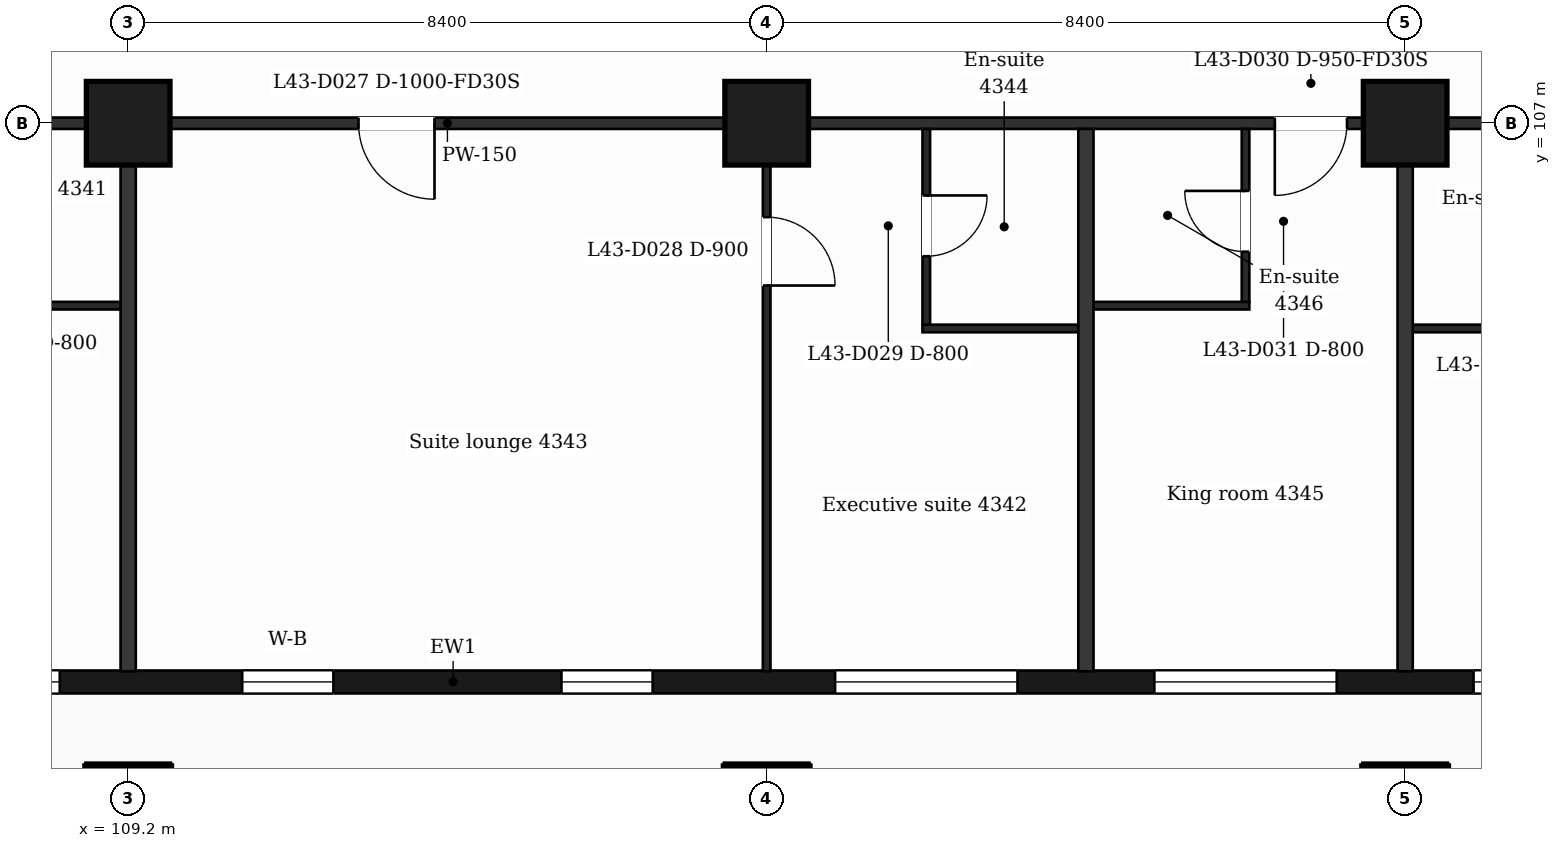
"""IFC4 building model, lengths in metres.
Left out: names, types, materials, properties, quantities, classifications, styles, units other than length and angle.
Written with IfcOpenShell. Run it as: python <this file> out.ifc"""

import sys

from ifc_helpers import new_model, si_unit, direction, frame, frame_2d, origin, origin_2d, place, context, subcontext, project, spatial, rectangle, extrude, element, fill, save


model = new_model("IFC4")
c1 = context("Model", 3, precision=1e-05, world=origin(), true_north=direction((0.0, 1.0)))
c2 = subcontext(c1, "Body", "Model", "MODEL_VIEW")
j1 = project(units=[si_unit("LENGTHUNIT", "METRE"), si_unit("PLANEANGLEUNIT", "RADIAN")], contexts=[c1])
p1 = place(None, origin())
s1 = spatial("IfcSite", under=j1, at=p1, CompositionType="ELEMENT")
p2 = place(p1, origin())
s2 = spatial("IfcBuilding", under=s1, at=p2, CompositionType="ELEMENT")
p3 = place(p2, frame((0.0, 0.0, 181.1)))
s3 = spatial("IfcBuildingStorey", under=s2, at=p3, CompositionType="ELEMENT", Elevation=181.1)
for number, where, z_axis, x_axis in (
    (1, (109.2, 98.0, 0.0), (0.0, 0.0, 1.0), (1.0, 0.0, 0.0)),
    (2, (117.6, 98.0, 0.0), (0.0, 0.0, 1.0), (1.0, 0.0, 0.0)),
    (3, (126.0, 98.0, 0.0), (0.0, 0.0, 1.0), (1.0, 0.0, 0.0)),
    (4, (109.2, 107.0, 0.0), (0.0, 0.0, 1.0), (1.0, 0.0, 0.0)),
    (5, (117.6, 107.0, 0.0), (0.0, 0.0, 1.0), (1.0, 0.0, 0.0)),
    (6, (126.0, 107.0, 0.0), (0.0, 0.0, 1.0), (1.0, 0.0, 0.0)),
):
    element("IfcColumn", number, at=place(p3, frame(where, z_axis=z_axis, x_axis=x_axis)), inside=s3, PredefinedType="COLUMN", context=c2, shape_type="SweptSolid", body=[
        extrude(rectangle(XDim=1.1, YDim=1.1, at=origin_2d()), origin(), (0.0, 0.0, 1.0), 3.7),
    ])
p4 = place(p3, frame((89.85, 99.65, 0.0), z_axis=(0.0, 0.0, 1.0), x_axis=(1.0, 0.0, 0.0)))
e7 = element("IfcWall", 7, at=p4, inside=s3, PredefinedType="SOLIDWALL", context=c2, shape_type="SweptSolid", body=[
    extrude(rectangle(XDim=47.25, YDim=0.3, at=frame_2d((23.625, 0.0))), origin(), (0.0, 0.0, 1.0), 3.38),
])
p5 = place(p4, frame((0.725, 0.0, 0.9)))
e8 = element("IfcOpeningElement", 8, at=p5, cuts=e7, PredefinedType="OPENING", context=c2, shape_type="SweptSolid", body=[
    extrude(rectangle(XDim=1.2, YDim=2.1, at=frame_2d((0.6, 1.05))), frame((0.0, 0.16, 0.0), z_axis=(0.0, -1.0, 0.0), x_axis=(1.0, 0.0, 0.0)), (0.0, 0.0, 1.0), 0.32),
])
p6 = place(p4, frame((3.45, 0.0, 0.9)))
e9 = element("IfcOpeningElement", 9, at=p6, cuts=e7, PredefinedType="OPENING", context=c2, shape_type="SweptSolid", body=[
    extrude(rectangle(XDim=2.4, YDim=2.1, at=frame_2d((1.2, 1.05))), frame((0.0, 0.16, 0.0), z_axis=(0.0, -1.0, 0.0), x_axis=(1.0, 0.0, 0.0)), (0.0, 0.0, 1.0), 0.32),
])
p7 = place(p4, frame((7.35, 0.0, 0.0)))
e10 = element("IfcOpeningElement", 10, at=p7, cuts=e7, PredefinedType="OPENING", context=c2, shape_type="SweptSolid", body=[
    extrude(rectangle(XDim=1.2, YDim=2.4, at=frame_2d((0.6, 1.2))), frame((0.0, 0.16, 0.0), z_axis=(0.0, -1.0, 0.0), x_axis=(1.0, 0.0, 0.0)), (0.0, 0.0, 1.0), 0.32),
])
p8 = place(p4, frame((9.15, 0.0, 0.9)))
e11 = element("IfcOpeningElement", 11, at=p8, cuts=e7, PredefinedType="OPENING", context=c2, shape_type="SweptSolid", body=[
    extrude(rectangle(XDim=1.2, YDim=2.1, at=frame_2d((0.6, 1.05))), frame((0.0, 0.16, 0.0), z_axis=(0.0, -1.0, 0.0), x_axis=(1.0, 0.0, 0.0)), (0.0, 0.0, 1.0), 0.32),
])
p9 = place(p4, frame((11.85, 0.0, 0.9)))
e12 = element("IfcOpeningElement", 12, at=p9, cuts=e7, PredefinedType="OPENING", context=c2, shape_type="SweptSolid", body=[
    extrude(rectangle(XDim=2.4, YDim=2.1, at=frame_2d((1.2, 1.05))), frame((0.0, 0.16, 0.0), z_axis=(0.0, -1.0, 0.0), x_axis=(1.0, 0.0, 0.0)), (0.0, 0.0, 1.0), 0.32),
])
p10 = place(p4, frame((16.05, 0.0, 0.9)))
e13 = element("IfcOpeningElement", 13, at=p10, cuts=e7, PredefinedType="OPENING", context=c2, shape_type="SweptSolid", body=[
    extrude(rectangle(XDim=2.4, YDim=2.1, at=frame_2d((1.2, 1.05))), frame((0.0, 0.16, 0.0), z_axis=(0.0, -1.0, 0.0), x_axis=(1.0, 0.0, 0.0)), (0.0, 0.0, 1.0), 0.32),
])
p11 = place(p4, frame((20.85, 0.0, 0.9)))
e14 = element("IfcOpeningElement", 14, at=p11, cuts=e7, PredefinedType="OPENING", context=c2, shape_type="SweptSolid", body=[
    extrude(rectangle(XDim=1.2, YDim=2.1, at=frame_2d((0.6, 1.05))), frame((0.0, 0.16, 0.0), z_axis=(0.0, -1.0, 0.0), x_axis=(1.0, 0.0, 0.0)), (0.0, 0.0, 1.0), 0.32),
])
p12 = place(p4, frame((25.05, 0.0, 0.9)))
e15 = element("IfcOpeningElement", 15, at=p12, cuts=e7, PredefinedType="OPENING", context=c2, shape_type="SweptSolid", body=[
    extrude(rectangle(XDim=1.2, YDim=2.1, at=frame_2d((0.6, 1.05))), frame((0.0, 0.16, 0.0), z_axis=(0.0, -1.0, 0.0), x_axis=(1.0, 0.0, 0.0)), (0.0, 0.0, 1.0), 0.32),
])
p13 = place(p4, frame((28.65, 0.0, 0.9)))
e16 = element("IfcOpeningElement", 16, at=p13, cuts=e7, PredefinedType="OPENING", context=c2, shape_type="SweptSolid", body=[
    extrude(rectangle(XDim=2.4, YDim=2.1, at=frame_2d((1.2, 1.05))), frame((0.0, 0.16, 0.0), z_axis=(0.0, -1.0, 0.0), x_axis=(1.0, 0.0, 0.0)), (0.0, 0.0, 1.0), 0.32),
])
p14 = place(p4, frame((32.85, 0.0, 0.9)))
e17 = element("IfcOpeningElement", 17, at=p14, cuts=e7, PredefinedType="OPENING", context=c2, shape_type="SweptSolid", body=[
    extrude(rectangle(XDim=2.4, YDim=2.1, at=frame_2d((1.2, 1.05))), frame((0.0, 0.16, 0.0), z_axis=(0.0, -1.0, 0.0), x_axis=(1.0, 0.0, 0.0)), (0.0, 0.0, 1.0), 0.32),
])
p15 = place(p4, frame((37.05, 0.0, 0.9)))
e18 = element("IfcOpeningElement", 18, at=p15, cuts=e7, PredefinedType="OPENING", context=c2, shape_type="SweptSolid", body=[
    extrude(rectangle(XDim=2.4, YDim=2.1, at=frame_2d((1.2, 1.05))), frame((0.0, 0.16, 0.0), z_axis=(0.0, -1.0, 0.0), x_axis=(1.0, 0.0, 0.0)), (0.0, 0.0, 1.0), 0.32),
])
p16 = place(p4, frame((41.25, 0.0, 0.9)))
e19 = element("IfcOpeningElement", 19, at=p16, cuts=e7, PredefinedType="OPENING", context=c2, shape_type="SweptSolid", body=[
    extrude(rectangle(XDim=2.4, YDim=2.1, at=frame_2d((1.2, 1.05))), frame((0.0, 0.16, 0.0), z_axis=(0.0, -1.0, 0.0), x_axis=(1.0, 0.0, 0.0)), (0.0, 0.0, 1.0), 0.32),
])
p17 = place(p4, frame((45.25, 0.0, 0.9)))
e20 = element("IfcOpeningElement", 20, at=p17, cuts=e7, PredefinedType="OPENING", context=c2, shape_type="SweptSolid", body=[
    extrude(rectangle(XDim=1.2, YDim=2.1, at=frame_2d((0.6, 1.05))), frame((0.0, 0.16, 0.0), z_axis=(0.0, -1.0, 0.0), x_axis=(1.0, 0.0, 0.0)), (0.0, 0.0, 1.0), 0.32),
])
p18 = place(p3, frame((119.65, 104.3, 0.0), z_axis=(0.0, 0.0, 1.0), x_axis=(1.0, 0.0, 0.0)))
e21 = element("IfcWall", 21, at=p18, inside=s3, PredefinedType="PARTITIONING", context=c2, shape_type="SweptSolid", body=[
    extrude(rectangle(XDim=2.15, YDim=0.1, at=frame_2d((1.075, 0.0))), origin(), (0.0, 0.0, 1.0), 3.38),
])
p19 = place(p3, frame((126.0, 104.3, 0.0), z_axis=(0.0, 0.0, 1.0), x_axis=(1.0, 0.0, 0.0)))
e22 = element("IfcWall", 22, at=p19, inside=s3, PredefinedType="PARTITIONING", context=c2, shape_type="SweptSolid", body=[
    extrude(rectangle(XDim=2.75, YDim=0.1, at=frame_2d((1.375, 0.0))), origin(), (0.0, 0.0, 1.0), 3.38),
])
p20 = place(p19, frame((1.07, 0.0, 0.0)))
e23 = element("IfcOpeningElement", 23, at=p20, cuts=e22, PredefinedType="OPENING", context=c2, shape_type="SweptSolid", body=[
    extrude(rectangle(XDim=0.8, YDim=2.1, at=frame_2d((0.4, 1.05))), frame((0.0, 0.06, 0.0), z_axis=(0.0, -1.0, 0.0), x_axis=(1.0, 0.0, 0.0)), (0.0, 0.0, 1.0), 0.12),
])
p21 = place(p3, frame((106.45, 104.6, 0.0), z_axis=(0.0, 0.0, 1.0), x_axis=(1.0, 0.0, 0.0)))
e24 = element("IfcWall", 24, at=p21, inside=s3, PredefinedType="PARTITIONING", context=c2, shape_type="SweptSolid", body=[
    extrude(rectangle(XDim=2.75, YDim=0.1, at=frame_2d((1.375, 0.0))), origin(), (0.0, 0.0, 1.0), 3.38),
])
p22 = place(p21, frame((0.88, 0.0, 0.0)))
e25 = element("IfcOpeningElement", 25, at=p22, cuts=e24, PredefinedType="OPENING", context=c2, shape_type="SweptSolid", body=[
    extrude(rectangle(XDim=0.8, YDim=2.1, at=frame_2d((0.4, 1.05))), frame((0.0, 0.06, 0.0), z_axis=(0.0, -1.0, 0.0), x_axis=(1.0, 0.0, 0.0)), (0.0, 0.0, 1.0), 0.12),
])
p23 = place(p3, frame((121.8, 104.6, 0.0), z_axis=(0.0, 0.0, 1.0), x_axis=(1.0, 0.0, 0.0)))
e26 = element("IfcWall", 26, at=p23, inside=s3, PredefinedType="PARTITIONING", context=c2, shape_type="SweptSolid", body=[
    extrude(rectangle(XDim=2.15, YDim=0.1, at=frame_2d((1.075, 0.0))), origin(), (0.0, 0.0, 1.0), 3.38),
])
p24 = place(p3, frame((87.018, 107.0, 0.0), z_axis=(0.0, 0.0, 1.0), x_axis=(1.0, 0.0, 0.0)))
e27 = element("IfcWall", 27, at=p24, inside=s3, PredefinedType="PARTITIONING", context=c2, shape_type="SweptSolid", body=[
    extrude(rectangle(XDim=52.765, YDim=0.15, at=frame_2d((26.382, 0.0))), origin(), (0.0, 0.0, 1.0), 3.38),
])
p25 = place(p24, frame((1.276, 0.0, 0.0)))
e28 = element("IfcOpeningElement", 28, at=p25, cuts=e27, PredefinedType="OPENING", context=c2, shape_type="SweptSolid", body=[
    extrude(rectangle(XDim=0.95, YDim=2.1, at=frame_2d((0.475, 1.05))), frame((0.0, 0.085, 0.0), z_axis=(0.0, -1.0, 0.0), x_axis=(1.0, 0.0, 0.0)), (0.0, 0.0, 1.0), 0.17),
])
p26 = place(p24, frame((8.357, 0.0, 0.0)))
e29 = element("IfcOpeningElement", 29, at=p26, cuts=e27, PredefinedType="OPENING", context=c2, shape_type="SweptSolid", body=[
    extrude(rectangle(XDim=0.95, YDim=2.1, at=frame_2d((0.475, 1.05))), frame((0.0, 0.085, 0.0), z_axis=(0.0, -1.0, 0.0), x_axis=(1.0, 0.0, 0.0)), (0.0, 0.0, 1.0), 0.17),
])
p27 = place(p24, frame((9.832, 0.0, 0.0)))
e30 = element("IfcOpeningElement", 30, at=p27, cuts=e27, PredefinedType="OPENING", context=c2, shape_type="SweptSolid", body=[
    extrude(rectangle(XDim=1.0, YDim=2.1, at=frame_2d((0.5, 1.05))), frame((0.0, 0.085, 0.0), z_axis=(0.0, -1.0, 0.0), x_axis=(1.0, 0.0, 0.0)), (0.0, 0.0, 1.0), 0.17),
])
p28 = place(p24, frame((14.547, 0.0, 0.0)))
e31 = element("IfcOpeningElement", 31, at=p28, cuts=e27, PredefinedType="OPENING", context=c2, shape_type="SweptSolid", body=[
    extrude(rectangle(XDim=0.95, YDim=2.1, at=frame_2d((0.475, 1.05))), frame((0.0, 0.085, 0.0), z_axis=(0.0, -1.0, 0.0), x_axis=(1.0, 0.0, 0.0)), (0.0, 0.0, 1.0), 0.17),
])
p29 = place(p24, frame((18.257, 0.0, 0.0)))
e32 = element("IfcOpeningElement", 32, at=p29, cuts=e27, PredefinedType="OPENING", context=c2, shape_type="SweptSolid", body=[
    extrude(rectangle(XDim=0.95, YDim=2.1, at=frame_2d((0.475, 1.05))), frame((0.0, 0.085, 0.0), z_axis=(0.0, -1.0, 0.0), x_axis=(1.0, 0.0, 0.0)), (0.0, 0.0, 1.0), 0.17),
])
p30 = place(p24, frame((25.212, 0.0, 0.0)))
e33 = element("IfcOpeningElement", 33, at=p30, cuts=e27, PredefinedType="OPENING", context=c2, shape_type="SweptSolid", body=[
    extrude(rectangle(XDim=1.0, YDim=2.1, at=frame_2d((0.5, 1.05))), frame((0.0, 0.085, 0.0), z_axis=(0.0, -1.0, 0.0), x_axis=(1.0, 0.0, 0.0)), (0.0, 0.0, 1.0), 0.17),
])
p31 = place(p24, frame((37.267, 0.0, 0.0)))
e34 = element("IfcOpeningElement", 34, at=p31, cuts=e27, PredefinedType="OPENING", context=c2, shape_type="SweptSolid", body=[
    extrude(rectangle(XDim=0.95, YDim=2.1, at=frame_2d((0.475, 1.05))), frame((0.0, 0.085, 0.0), z_axis=(0.0, -1.0, 0.0), x_axis=(1.0, 0.0, 0.0)), (0.0, 0.0, 1.0), 0.17),
])
p32 = place(p24, frame((41.957, 0.0, 0.0)))
e35 = element("IfcOpeningElement", 35, at=p32, cuts=e27, PredefinedType="OPENING", context=c2, shape_type="SweptSolid", body=[
    extrude(rectangle(XDim=0.95, YDim=2.1, at=frame_2d((0.475, 1.05))), frame((0.0, 0.085, 0.0), z_axis=(0.0, -1.0, 0.0), x_axis=(1.0, 0.0, 0.0)), (0.0, 0.0, 1.0), 0.17),
])
p33 = place(p24, frame((45.632, 0.0, 0.0)))
e36 = element("IfcOpeningElement", 36, at=p33, cuts=e27, PredefinedType="OPENING", context=c2, shape_type="SweptSolid", body=[
    extrude(rectangle(XDim=0.95, YDim=2.1, at=frame_2d((0.475, 1.05))), frame((0.0, 0.085, 0.0), z_axis=(0.0, -1.0, 0.0), x_axis=(1.0, 0.0, 0.0)), (0.0, 0.0, 1.0), 0.17),
])
p34 = place(p24, frame((48.767, 0.0, 0.0)))
e37 = element("IfcOpeningElement", 37, at=p34, cuts=e27, PredefinedType="OPENING", context=c2, shape_type="SweptSolid", body=[
    extrude(rectangle(XDim=0.95, YDim=2.1, at=frame_2d((0.475, 1.05))), frame((0.0, 0.085, 0.0), z_axis=(0.0, -1.0, 0.0), x_axis=(1.0, 0.0, 0.0)), (0.0, 0.0, 1.0), 0.17),
])
p35 = place(p3, frame((109.2, 99.79, 0.0), z_axis=(0.0, 0.0, 1.0), x_axis=(0.0, 1.0, 0.0)))
e38 = element("IfcWall", 38, at=p35, inside=s3, PredefinedType="PARTITIONING", context=c2, shape_type="SweptSolid", body=[
    extrude(rectangle(XDim=7.135, YDim=0.2, at=frame_2d((3.567, 0.0))), origin(), (0.0, 0.0, 1.0), 3.38),
])
p36 = place(p3, frame((117.6, 99.79, 0.0), z_axis=(0.0, 0.0, 1.0), x_axis=(0.0, 1.0, 0.0)))
e39 = element("IfcWall", 39, at=p36, inside=s3, PredefinedType="PARTITIONING", context=c2, shape_type="SweptSolid", body=[
    extrude(rectangle(XDim=7.135, YDim=0.1, at=frame_2d((3.567, 0.0))), origin(), (0.0, 0.0, 1.0), 3.38),
])
p37 = place(p36, frame((5.075, 0.0, 0.0)))
e40 = element("IfcOpeningElement", 40, at=p37, cuts=e39, PredefinedType="OPENING", context=c2, shape_type="SweptSolid", body=[
    extrude(rectangle(XDim=0.9, YDim=2.1, at=frame_2d((0.45, 1.05))), frame((0.0, 0.06, 0.0), z_axis=(0.0, -1.0, 0.0), x_axis=(1.0, 0.0, 0.0)), (0.0, 0.0, 1.0), 0.12),
])
p38 = place(p3, frame((119.7, 104.35, 0.0), z_axis=(0.0, 0.0, 1.0), x_axis=(0.0, 1.0, 0.0)))
e41 = element("IfcWall", 41, at=p38, inside=s3, PredefinedType="PARTITIONING", context=c2, shape_type="SweptSolid", body=[
    extrude(rectangle(XDim=2.575, YDim=0.1, at=frame_2d((1.288, 0.0))), origin(), (0.0, 0.0, 1.0), 3.38),
])
p39 = place(p38, frame((0.9, 0.0, 0.0)))
e42 = element("IfcOpeningElement", 42, at=p39, cuts=e41, PredefinedType="OPENING", context=c2, shape_type="SweptSolid", body=[
    extrude(rectangle(XDim=0.8, YDim=2.1, at=frame_2d((0.4, 1.05))), frame((0.0, 0.06, 0.0), z_axis=(0.0, -1.0, 0.0), x_axis=(1.0, 0.0, 0.0)), (0.0, 0.0, 1.0), 0.12),
])
p40 = place(p3, frame((121.8, 99.79, 0.0), z_axis=(0.0, 0.0, 1.0), x_axis=(0.0, 1.0, 0.0)))
e43 = element("IfcWall", 43, at=p40, inside=s3, PredefinedType="PARTITIONING", context=c2, shape_type="SweptSolid", body=[
    extrude(rectangle(XDim=7.135, YDim=0.2, at=frame_2d((3.567, 0.0))), origin(), (0.0, 0.0, 1.0), 3.38),
])
p41 = place(p3, frame((123.9, 104.65, 0.0), z_axis=(0.0, 0.0, 1.0), x_axis=(0.0, 1.0, 0.0)))
e44 = element("IfcWall", 44, at=p41, inside=s3, PredefinedType="PARTITIONING", context=c2, shape_type="SweptSolid", body=[
    extrude(rectangle(XDim=2.275, YDim=0.1, at=frame_2d((1.138, 0.0))), origin(), (0.0, 0.0, 1.0), 3.38),
])
p42 = place(p41, frame((0.66, 0.0, 0.0)))
e45 = element("IfcOpeningElement", 45, at=p42, cuts=e44, PredefinedType="OPENING", context=c2, shape_type="SweptSolid", body=[
    extrude(rectangle(XDim=0.8, YDim=2.1, at=frame_2d((0.4, 1.05))), frame((0.0, 0.06, 0.0), z_axis=(0.0, -1.0, 0.0), x_axis=(1.0, 0.0, 0.0)), (0.0, 0.0, 1.0), 0.12),
])
p43 = place(p3, frame((126.0, 99.79, 0.0), z_axis=(0.0, 0.0, 1.0), x_axis=(0.0, 1.0, 0.0)))
e46 = element("IfcWall", 46, at=p43, inside=s3, PredefinedType="PARTITIONING", context=c2, shape_type="SweptSolid", body=[
    extrude(rectangle(XDim=7.135, YDim=0.2, at=frame_2d((3.567, 0.0))), origin(), (0.0, 0.0, 1.0), 3.38),
])
p44 = place(p10, origin())
e47 = element("IfcWindow", 47, at=p44, inside=s3, PartitioningType="SINGLE_PANEL", PredefinedType="WINDOW", context=c2, shape_type="SweptSolid", body=[
    extrude(rectangle(XDim=2.4, YDim=2.1, at=frame_2d((1.2, 1.05))), frame((0.0, 0.03, 0.0), z_axis=(0.0, -1.0, 0.0), x_axis=(1.0, 0.0, 0.0)), (0.0, 0.0, 1.0), 0.06),
])
fill(e13, e47)
p45 = place(p11, origin())
e48 = element("IfcWindow", 48, at=p45, inside=s3, PartitioningType="SINGLE_PANEL", PredefinedType="WINDOW", context=c2, shape_type="SweptSolid", body=[
    extrude(rectangle(XDim=1.2, YDim=2.1, at=frame_2d((0.6, 1.05))), frame((0.0, 0.03, 0.0), z_axis=(0.0, -1.0, 0.0), x_axis=(1.0, 0.0, 0.0)), (0.0, 0.0, 1.0), 0.06),
])
fill(e14, e48)
p46 = place(p12, origin())
e49 = element("IfcWindow", 49, at=p46, inside=s3, PartitioningType="SINGLE_PANEL", PredefinedType="WINDOW", context=c2, shape_type="SweptSolid", body=[
    extrude(rectangle(XDim=1.2, YDim=2.1, at=frame_2d((0.6, 1.05))), frame((0.0, 0.03, 0.0), z_axis=(0.0, -1.0, 0.0), x_axis=(1.0, 0.0, 0.0)), (0.0, 0.0, 1.0), 0.06),
])
fill(e15, e49)
p47 = place(p13, origin())
e50 = element("IfcWindow", 50, at=p47, inside=s3, PartitioningType="SINGLE_PANEL", PredefinedType="WINDOW", context=c2, shape_type="SweptSolid", body=[
    extrude(rectangle(XDim=2.4, YDim=2.1, at=frame_2d((1.2, 1.05))), frame((0.0, 0.03, 0.0), z_axis=(0.0, -1.0, 0.0), x_axis=(1.0, 0.0, 0.0)), (0.0, 0.0, 1.0), 0.06),
])
fill(e16, e50)
p48 = place(p14, origin())
e51 = element("IfcWindow", 51, at=p48, inside=s3, PartitioningType="SINGLE_PANEL", PredefinedType="WINDOW", context=c2, shape_type="SweptSolid", body=[
    extrude(rectangle(XDim=2.4, YDim=2.1, at=frame_2d((1.2, 1.05))), frame((0.0, 0.03, 0.0), z_axis=(0.0, -1.0, 0.0), x_axis=(1.0, 0.0, 0.0)), (0.0, 0.0, 1.0), 0.06),
])
fill(e17, e51)
p49 = place(p15, origin())
e52 = element("IfcWindow", 52, at=p49, inside=s3, PartitioningType="SINGLE_PANEL", PredefinedType="WINDOW", context=c2, shape_type="SweptSolid", body=[
    extrude(rectangle(XDim=2.4, YDim=2.1, at=frame_2d((1.2, 1.05))), frame((0.0, 0.03, 0.0), z_axis=(0.0, -1.0, 0.0), x_axis=(1.0, 0.0, 0.0)), (0.0, 0.0, 1.0), 0.06),
])
fill(e18, e52)
p50 = place(p30, origin())
e53 = element("IfcDoor", 53, at=p50, inside=s3, OperationType="SINGLE_SWING_RIGHT", PredefinedType="DOOR", context=c2, shape_type="SweptSolid", body=[
    extrude(rectangle(XDim=1.0, YDim=2.1, at=frame_2d((0.5, 1.05))), frame((0.0, 0.025, 0.0), z_axis=(0.0, -1.0, 0.0), x_axis=(1.0, 0.0, 0.0)), (0.0, 0.0, 1.0), 0.05),
])
fill(e33, e53)
p51 = place(p37, origin())
e54 = element("IfcDoor", 54, at=p51, inside=s3, OperationType="SINGLE_SWING_LEFT", PredefinedType="DOOR", context=c2, shape_type="SweptSolid", body=[
    extrude(rectangle(XDim=0.9, YDim=2.1, at=frame_2d((0.45, 1.05))), frame((0.0, 0.025, 0.0), z_axis=(0.0, -1.0, 0.0), x_axis=(1.0, 0.0, 0.0)), (0.0, 0.0, 1.0), 0.05),
])
fill(e40, e54)
p52 = place(p39, origin())
e55 = element("IfcDoor", 55, at=p52, inside=s3, OperationType="SINGLE_SWING_RIGHT", PredefinedType="DOOR", context=c2, shape_type="SweptSolid", body=[
    extrude(rectangle(XDim=0.8, YDim=2.1, at=frame_2d((0.4, 1.05))), frame((0.0, 0.025, 0.0), z_axis=(0.0, -1.0, 0.0), x_axis=(1.0, 0.0, 0.0)), (0.0, 0.0, 1.0), 0.05),
])
fill(e42, e55)
p53 = place(p31, origin())
e56 = element("IfcDoor", 56, at=p53, inside=s3, OperationType="SINGLE_SWING_LEFT", PredefinedType="DOOR", context=c2, shape_type="SweptSolid", body=[
    extrude(rectangle(XDim=0.95, YDim=2.1, at=frame_2d((0.475, 1.05))), frame((0.0, 0.025, 0.0), z_axis=(0.0, -1.0, 0.0), x_axis=(1.0, 0.0, 0.0)), (0.0, 0.0, 1.0), 0.05),
])
fill(e34, e56)
p54 = place(p42, origin())
e57 = element("IfcDoor", 57, at=p54, inside=s3, OperationType="SINGLE_SWING_RIGHT", PredefinedType="DOOR", context=c2, shape_type="SweptSolid", body=[
    extrude(rectangle(XDim=0.8, YDim=2.1, at=frame_2d((0.4, 1.05))), frame((0.0, 0.025, 0.0), z_axis=(0.0, -1.0, 0.0), x_axis=(1.0, 0.0, 0.0)), (0.0, 0.0, 1.0), 0.05),
])
fill(e45, e57)
save(model, sys.argv[1])
